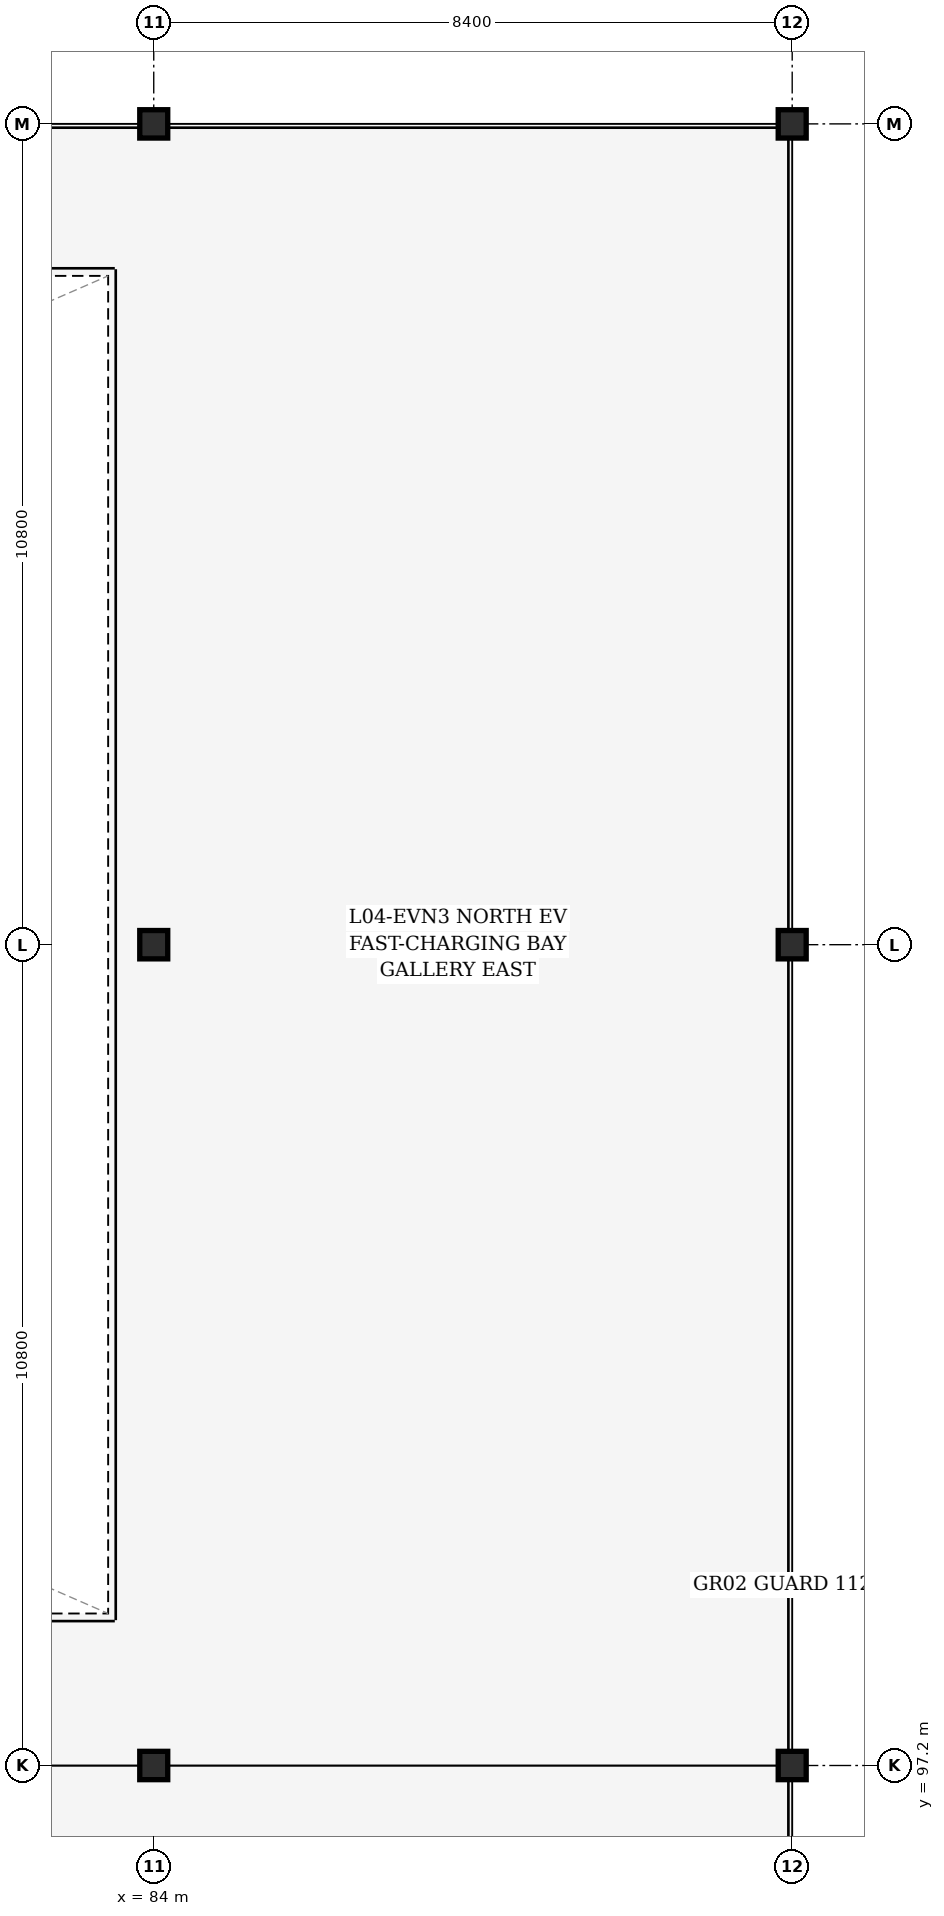
"""IFC4 building model, lengths in metres.
Left out: names, types, materials, properties, quantities, classifications, styles, units other than length and angle.
Written with IfcOpenShell. Run it as: python <this file> out.ifc"""

import sys

from ifc_helpers import new_model, si_unit, direction, frame, origin, origin_2d, place, context, subcontext, project, spatial, i_section, extrude, element, save


model = new_model("IFC4")
c1 = context("Model", 3, precision=1e-05, world=origin(), true_north=direction((0.0, 1.0)))
c2 = subcontext(c1, "Body", "Model", "MODEL_VIEW")
j1 = project(units=[si_unit("LENGTHUNIT", "METRE"), si_unit("PLANEANGLEUNIT", "RADIAN")], contexts=[c1])
p1 = place(None, origin())
s1 = spatial("IfcSite", under=j1, at=p1, CompositionType="ELEMENT")
p2 = place(p1, origin())
s2 = spatial("IfcBuilding", under=s1, at=p2, CompositionType="ELEMENT")
p3 = place(p2, frame((0.0, 0.0, 16.2)))
s3 = spatial("IfcBuildingStorey", under=s2, at=p3, CompositionType="ELEMENT", Elevation=16.2)
for number, where, z_axis, x_axis in (
    (1, (84.0, 97.2, 0.0), (0.0, 0.0, 1.0), (1.0, 0.0, 0.0)),
    (2, (84.0, 108.0, 0.0), (0.0, 0.0, 1.0), (1.0, 0.0, 0.0)),
    (3, (84.0, 118.8, 0.0), (0.0, 0.0, 1.0), (1.0, 0.0, 0.0)),
    (4, (92.4, 97.2, 0.0), (0.0, 0.0, 1.0), (1.0, 0.0, 0.0)),
    (5, (92.4, 108.0, 0.0), (0.0, 0.0, 1.0), (1.0, 0.0, 0.0)),
    (6, (92.4, 118.8, 0.0), (0.0, 0.0, 1.0), (1.0, 0.0, 0.0)),
):
    element("IfcColumn", number, at=place(p3, frame(where, z_axis=z_axis, x_axis=x_axis)), inside=s3, PredefinedType="COLUMN", context=c2, shape_type="SweptSolid", body=[
        extrude(i_section(OverallWidth=0.373, OverallDepth=0.368, WebThickness=0.014, FlangeThickness=0.024, FilletRadius=0.015, at=origin_2d()), origin(), (0.0, 0.0, 1.0), 3.6),
    ])
save(model, sys.argv[1])
